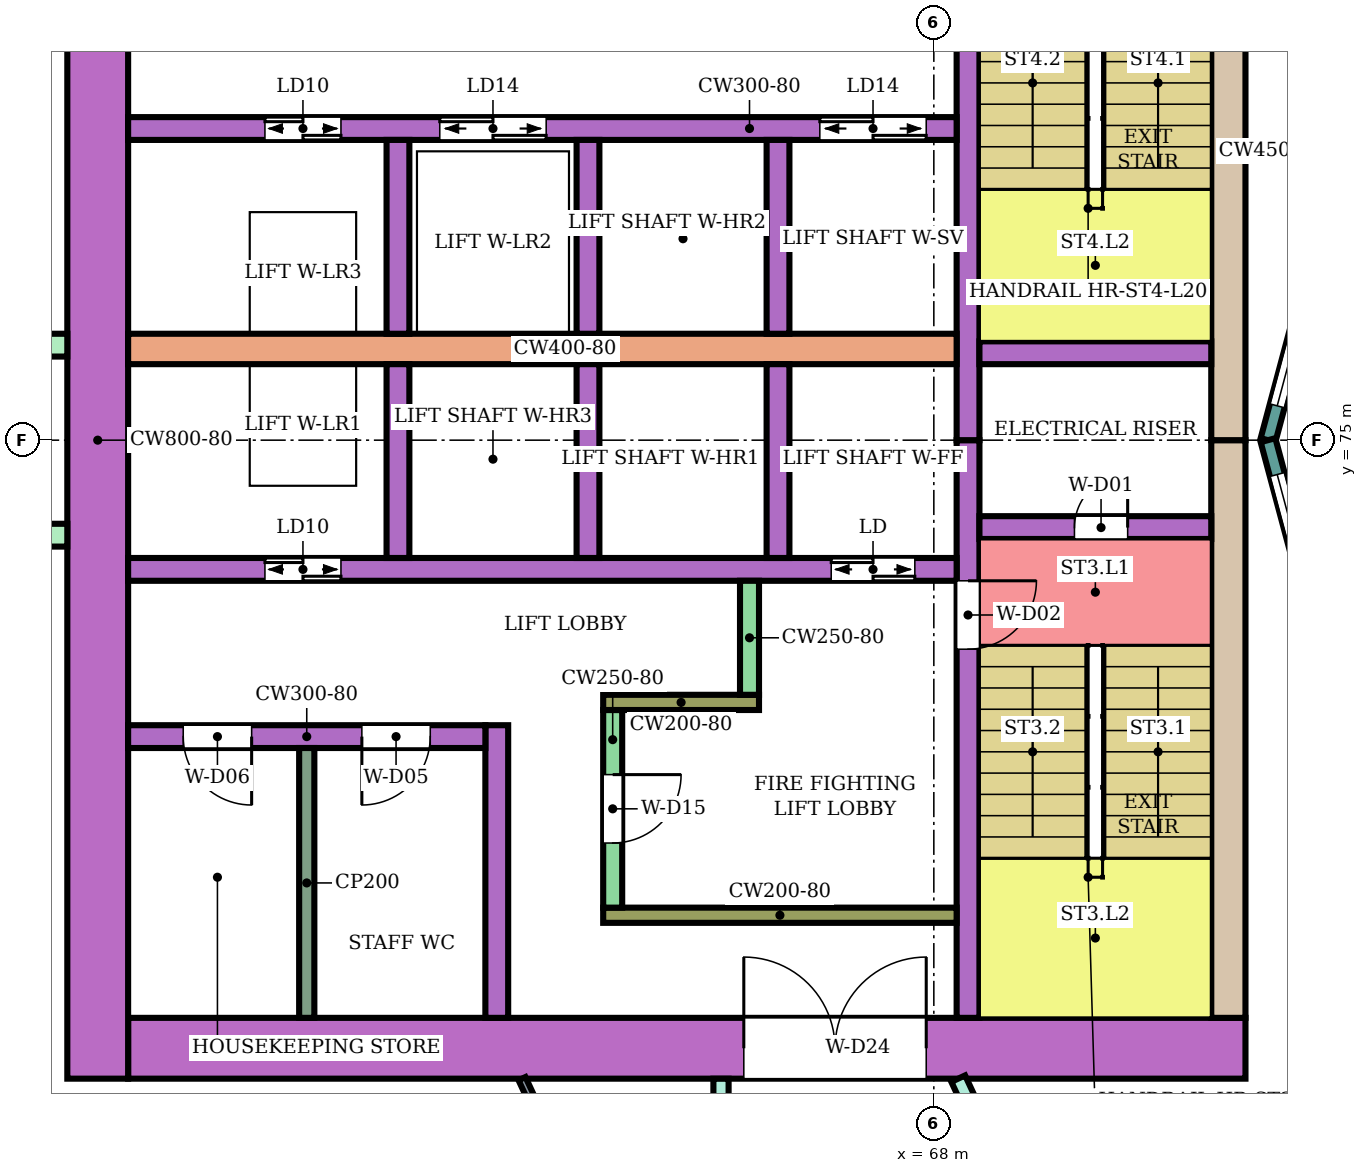
"""IFC4 building model, lengths in metres.
Left out: names, types, materials, properties, quantities, classifications, styles, units other than length and angle.
Written with IfcOpenShell. Run it as: python <this file> out.ifc"""

import sys

from ifc_helpers import new_model, si_unit, direction, frame, frame_2d, origin, place, context, subcontext, project, spatial, rectangle, extrude, element, fill, save


model = new_model("IFC4")
c1 = context("Model", 3, precision=1e-05, world=origin(), true_north=direction((0.0, 1.0)))
c2 = subcontext(c1, "Body", "Model", "MODEL_VIEW")
j1 = project(units=[si_unit("LENGTHUNIT", "METRE"), si_unit("PLANEANGLEUNIT", "RADIAN")], contexts=[c1])
p1 = place(None, origin())
s1 = spatial("IfcSite", under=j1, at=p1, CompositionType="ELEMENT")
p2 = place(p1, origin())
s2 = spatial("IfcBuilding", under=s1, at=p2, CompositionType="ELEMENT")
p3 = place(p2, frame((0.0, 0.0, 90.0)))
s3 = spatial("IfcBuildingStorey", under=s2, at=p3, CompositionType="ELEMENT", Elevation=90.0)
p4 = place(p3, frame((72.1, 67.0, 0.0), z_axis=(0.0, 0.0, 1.0), x_axis=(-1.0, 0.0, 0.0)))
e1 = element("IfcWall", 1, at=p4, inside=s3, PredefinedType="SHEAR", context=c2, shape_type="SweptSolid", body=[
    extrude(rectangle(XDim=14.7, YDim=0.8, at=frame_2d((7.35, 0.0))), origin(), (0.0, 0.0, 1.0), 3.48),
])
p5 = place(p4, frame((4.2, 0.0, 0.0)))
e2 = element("IfcOpeningElement", 2, at=p5, cuts=e1, PredefinedType="OPENING", context=c2, shape_type="SweptSolid", body=[
    extrude(rectangle(XDim=2.4, YDim=2.4, at=frame_2d((1.2, 1.2))), frame((0.0, 0.41, 0.0), z_axis=(0.0, -1.0, 0.0), x_axis=(1.0, 0.0, 0.0)), (0.0, 0.0, 1.0), 0.82),
])
for number, where, z_axis, x_axis in (
    (3, (71.875, 75.0, 0.0), (0.0, 0.0, 1.0), (0.0, -1.0, 0.0)),
    (4, (71.875, 82.6, 0.0), (0.0, 0.0, 1.0), (0.0, -1.0, 0.0)),
):
    element("IfcWall", number, at=place(p3, frame(where, z_axis=z_axis, x_axis=x_axis)), inside=s3, PredefinedType="SHEAR", context=c2, shape_type="SweptSolid", body=[
        extrude(rectangle(XDim=7.6, YDim=0.45, at=frame_2d((3.8, 0.0))), origin(), (0.0, 0.0, 1.0), 3.48),
    ])
p6 = place(p3, frame((57.0, 83.4, 0.0), z_axis=(0.0, 0.0, 1.0), x_axis=(0.0, -1.0, 0.0)))
e5 = element("IfcWall", 5, at=p6, inside=s3, PredefinedType="SHEAR", context=c2, shape_type="SweptSolid", body=[
    extrude(rectangle(XDim=16.8, YDim=0.8, at=frame_2d((8.4, 0.0))), origin(), (0.0, 0.0, 1.0), 3.48),
])
p7 = place(p3, frame((68.45, 75.0, 0.0), z_axis=(0.0, 0.0, 1.0), x_axis=(0.0, -1.0, 0.0)))
e6 = element("IfcWall", 6, at=p7, inside=s3, PredefinedType="SHEAR", context=c2, shape_type="SweptSolid", body=[
    extrude(rectangle(XDim=7.6, YDim=0.3, at=frame_2d((3.8, 0.0))), origin(), (0.0, 0.0, 1.0), 3.48),
])
p8 = place(p7, frame((1.85, 0.0, 0.0)))
e7 = element("IfcOpeningElement", 7, at=p8, cuts=e6, PredefinedType="OPENING", context=c2, shape_type="SweptSolid", body=[
    extrude(rectangle(XDim=0.9, YDim=2.1, at=frame_2d((0.45, 1.05))), frame((0.0, 0.16, 0.0), z_axis=(0.0, -1.0, 0.0), x_axis=(1.0, 0.0, 0.0)), (0.0, 0.0, 1.0), 0.32),
])
p9 = place(p3, frame((68.45, 82.6, 0.0), z_axis=(0.0, 0.0, 1.0), x_axis=(0.0, -1.0, 0.0)))
e8 = element("IfcWall", 8, at=p9, inside=s3, PredefinedType="SHEAR", context=c2, shape_type="SweptSolid", body=[
    extrude(rectangle(XDim=7.6, YDim=0.3, at=frame_2d((3.8, 0.0))), origin(), (0.0, 0.0, 1.0), 3.48),
])
p10 = place(p9, frame((0.25, 0.0, 0.0)))
e9 = element("IfcOpeningElement", 9, at=p10, cuts=e8, PredefinedType="OPENING", context=c2, shape_type="SweptSolid", body=[
    extrude(rectangle(XDim=0.9, YDim=2.1, at=frame_2d((0.45, 1.05))), frame((0.0, 0.16, 0.0), z_axis=(0.0, -1.0, 0.0), x_axis=(1.0, 0.0, 0.0)), (0.0, 0.0, 1.0), 0.32),
])
p11 = place(p3, frame((71.65, 73.85, 0.0), z_axis=(0.0, 0.0, 1.0), x_axis=(-1.0, 0.0, 0.0)))
e10 = element("IfcWall", 10, at=p11, inside=s3, PredefinedType="SHEAR", context=c2, shape_type="SweptSolid", body=[
    extrude(rectangle(XDim=3.05, YDim=0.3, at=frame_2d((1.525, 0.0))), origin(), (0.0, 0.0, 1.0), 3.48),
])
p12 = place(p11, frame((1.1, 0.0, 0.0)))
e11 = element("IfcOpeningElement", 11, at=p12, cuts=e10, PredefinedType="OPENING", context=c2, shape_type="SweptSolid", body=[
    extrude(rectangle(XDim=0.7, YDim=2.0, at=frame_2d((0.35, 1.0))), frame((0.0, 0.16, 0.0), z_axis=(0.0, -1.0, 0.0), x_axis=(1.0, 0.0, 0.0)), (0.0, 0.0, 1.0), 0.32),
])
p13 = place(p3, frame((71.65, 76.15, 0.0), z_axis=(0.0, 0.0, 1.0), x_axis=(-1.0, 0.0, 0.0)))
e12 = element("IfcWall", 12, at=p13, inside=s3, PredefinedType="SHEAR", context=c2, shape_type="SweptSolid", body=[
    extrude(rectangle(XDim=3.05, YDim=0.3, at=frame_2d((1.525, 0.0))), origin(), (0.0, 0.0, 1.0), 3.48),
])
p14 = place(p3, frame((68.3, 73.3, 0.0), z_axis=(0.0, 0.0, 1.0), x_axis=(-1.0, 0.0, 0.0)))
e13 = element("IfcWall", 13, at=p14, inside=s3, PredefinedType="SHEAR", context=c2, shape_type="SweptSolid", body=[
    extrude(rectangle(XDim=10.9, YDim=0.3, at=frame_2d((5.45, 0.0))), origin(), (0.0, 0.0, 1.0), 3.48),
])
p15 = place(p14, frame((0.55, 0.0, 0.0)))
e14 = element("IfcOpeningElement", 14, at=p15, cuts=e13, PredefinedType="OPENING", context=c2, shape_type="SweptSolid", body=[
    extrude(rectangle(XDim=1.1, YDim=2.1, at=frame_2d((0.55, 1.05))), frame((0.0, 0.16, 0.0), z_axis=(0.0, -1.0, 0.0), x_axis=(1.0, 0.0, 0.0)), (0.0, 0.0, 1.0), 0.32),
])
p16 = place(p14, frame((8.1, 0.0, 0.0)))
e15 = element("IfcOpeningElement", 15, at=p16, cuts=e13, PredefinedType="OPENING", context=c2, shape_type="SweptSolid", body=[
    extrude(rectangle(XDim=1.0, YDim=2.1, at=frame_2d((0.5, 1.05))), frame((0.0, 0.16, 0.0), z_axis=(0.0, -1.0, 0.0), x_axis=(1.0, 0.0, 0.0)), (0.0, 0.0, 1.0), 0.32),
])
p17 = place(p3, frame((68.3, 76.2, 0.0), z_axis=(0.0, 0.0, 1.0), x_axis=(-1.0, 0.0, 0.0)))
e16 = element("IfcWall", 16, at=p17, inside=s3, PredefinedType="SHEAR", context=c2, shape_type="SweptSolid", body=[
    extrude(rectangle(XDim=10.9, YDim=0.4, at=frame_2d((5.45, 0.0))), origin(), (0.0, 0.0, 1.0), 3.48),
])
p18 = place(p3, frame((68.3, 79.1, 0.0), z_axis=(0.0, 0.0, 1.0), x_axis=(-1.0, 0.0, 0.0)))
e17 = element("IfcWall", 17, at=p18, inside=s3, PredefinedType="SHEAR", context=c2, shape_type="SweptSolid", body=[
    extrude(rectangle(XDim=10.9, YDim=0.3, at=frame_2d((5.45, 0.0))), origin(), (0.0, 0.0, 1.0), 3.48),
])
p19 = place(p18, frame((0.4, 0.0, 0.0)))
e18 = element("IfcOpeningElement", 18, at=p19, cuts=e17, PredefinedType="OPENING", context=c2, shape_type="SweptSolid", body=[
    extrude(rectangle(XDim=1.4, YDim=2.1, at=frame_2d((0.7, 1.05))), frame((0.0, 0.16, 0.0), z_axis=(0.0, -1.0, 0.0), x_axis=(1.0, 0.0, 0.0)), (0.0, 0.0, 1.0), 0.32),
])
p20 = place(p18, frame((5.4, 0.0, 0.0)))
e19 = element("IfcOpeningElement", 19, at=p20, cuts=e17, PredefinedType="OPENING", context=c2, shape_type="SweptSolid", body=[
    extrude(rectangle(XDim=1.4, YDim=2.1, at=frame_2d((0.7, 1.05))), frame((0.0, 0.16, 0.0), z_axis=(0.0, -1.0, 0.0), x_axis=(1.0, 0.0, 0.0)), (0.0, 0.0, 1.0), 0.32),
])
p21 = place(p18, frame((8.1, 0.0, 0.0)))
e20 = element("IfcOpeningElement", 20, at=p21, cuts=e17, PredefinedType="OPENING", context=c2, shape_type="SweptSolid", body=[
    extrude(rectangle(XDim=1.0, YDim=2.1, at=frame_2d((0.5, 1.05))), frame((0.0, 0.16, 0.0), z_axis=(0.0, -1.0, 0.0), x_axis=(1.0, 0.0, 0.0)), (0.0, 0.0, 1.0), 0.32),
])
for number, where, z_axis, x_axis in (
    (21, (65.95, 76.0, 0.0), (0.0, 0.0, 1.0), (0.0, -1.0, 0.0)),
    (22, (63.45, 76.0, 0.0), (0.0, 0.0, 1.0), (0.0, -1.0, 0.0)),
    (23, (60.95, 76.0, 0.0), (0.0, 0.0, 1.0), (0.0, -1.0, 0.0)),
    (24, (65.95, 78.95, 0.0), (0.0, 0.0, 1.0), (0.0, -1.0, 0.0)),
    (25, (63.45, 78.95, 0.0), (0.0, 0.0, 1.0), (0.0, -1.0, 0.0)),
    (26, (60.95, 78.95, 0.0), (0.0, 0.0, 1.0), (0.0, -1.0, 0.0)),
):
    element("IfcWall", number, at=place(p3, frame(where, z_axis=z_axis, x_axis=x_axis)), inside=s3, PredefinedType="SHEAR", context=c2, shape_type="SweptSolid", body=[
        extrude(rectangle(XDim=2.55, YDim=0.3, at=frame_2d((1.275, 0.0))), origin(), (0.0, 0.0, 1.0), 3.48),
    ])
p22 = place(p3, frame((68.3, 68.75, 0.0), z_axis=(0.0, 0.0, 1.0), x_axis=(-1.0, 0.0, 0.0)))
e27 = element("IfcWall", 27, at=p22, inside=s3, PredefinedType="SHEAR", context=c2, shape_type="SweptSolid", body=[
    extrude(rectangle(XDim=4.65, YDim=0.2, at=frame_2d((2.325, 0.0))), origin(), (0.0, 0.0, 1.0), 3.48),
])
p23 = place(p3, frame((63.775, 71.45, 0.0), z_axis=(0.0, 0.0, 1.0), x_axis=(0.0, -1.0, 0.0)))
e28 = element("IfcWall", 28, at=p23, inside=s3, PredefinedType="SHEAR", context=c2, shape_type="SweptSolid", body=[
    extrude(rectangle(XDim=2.6, YDim=0.25, at=frame_2d((1.3, 0.0))), origin(), (0.0, 0.0, 1.0), 3.48),
])
p24 = place(p23, frame((0.85, 0.0, 0.0)))
e29 = element("IfcOpeningElement", 29, at=p24, cuts=e28, PredefinedType="OPENING", context=c2, shape_type="SweptSolid", body=[
    extrude(rectangle(XDim=0.9, YDim=2.1, at=frame_2d((0.45, 1.05))), frame((0.0, 0.135, 0.0), z_axis=(0.0, -1.0, 0.0), x_axis=(1.0, 0.0, 0.0)), (0.0, 0.0, 1.0), 0.27),
])
p25 = place(p3, frame((65.7, 71.55, 0.0), z_axis=(0.0, 0.0, 1.0), x_axis=(-1.0, 0.0, 0.0)))
e30 = element("IfcWall", 30, at=p25, inside=s3, PredefinedType="SHEAR", context=c2, shape_type="SweptSolid", body=[
    extrude(rectangle(XDim=2.05, YDim=0.2, at=frame_2d((1.025, 0.0))), origin(), (0.0, 0.0, 1.0), 3.48),
])
p26 = place(p3, frame((65.575, 73.15, 0.0), z_axis=(0.0, 0.0, 1.0), x_axis=(0.0, -1.0, 0.0)))
e31 = element("IfcWall", 31, at=p26, inside=s3, PredefinedType="SHEAR", context=c2, shape_type="SweptSolid", body=[
    extrude(rectangle(XDim=1.5, YDim=0.25, at=frame_2d((0.75, 0.0))), origin(), (0.0, 0.0, 1.0), 3.48),
])
p27 = place(p3, frame((62.25, 71.25, 0.0), z_axis=(0.0, 0.0, 1.0), x_axis=(0.0, -1.0, 0.0)))
e32 = element("IfcWall", 32, at=p27, inside=s3, PredefinedType="SHEAR", context=c2, shape_type="SweptSolid", body=[
    extrude(rectangle(XDim=3.85, YDim=0.3, at=frame_2d((1.925, 0.0))), origin(), (0.0, 0.0, 1.0), 3.48),
])
p28 = place(p3, frame((62.1, 71.1, 0.0), z_axis=(0.0, 0.0, 1.0), x_axis=(-1.0, 0.0, 0.0)))
e33 = element("IfcWall", 33, at=p28, inside=s3, PredefinedType="SHEAR", context=c2, shape_type="SweptSolid", body=[
    extrude(rectangle(XDim=4.7, YDim=0.3, at=frame_2d((2.35, 0.0))), origin(), (0.0, 0.0, 1.0), 3.48),
])
p29 = place(p28, frame((0.725, 0.0, 0.0)))
e34 = element("IfcOpeningElement", 34, at=p29, cuts=e33, PredefinedType="OPENING", context=c2, shape_type="SweptSolid", body=[
    extrude(rectangle(XDim=0.9, YDim=2.1, at=frame_2d((0.45, 1.05))), frame((0.0, 0.16, 0.0), z_axis=(0.0, -1.0, 0.0), x_axis=(1.0, 0.0, 0.0)), (0.0, 0.0, 1.0), 0.32),
])
p30 = place(p28, frame((3.075, 0.0, 0.0)))
e35 = element("IfcOpeningElement", 35, at=p30, cuts=e33, PredefinedType="OPENING", context=c2, shape_type="SweptSolid", body=[
    extrude(rectangle(XDim=0.9, YDim=2.1, at=frame_2d((0.45, 1.05))), frame((0.0, 0.16, 0.0), z_axis=(0.0, -1.0, 0.0), x_axis=(1.0, 0.0, 0.0)), (0.0, 0.0, 1.0), 0.32),
])
for number, where, z_axis, x_axis in (
    (36, (56.6, 76.25, 0.0), (0.0, 0.0, 1.0), (-1.0, 0.0, 0.0)),
    (37, (56.6, 73.75, 0.0), (0.0, 0.0, 1.0), (-1.0, 0.0, 0.0)),
):
    element("IfcWall", number, at=place(p3, frame(where, z_axis=z_axis, x_axis=x_axis)), inside=s3, PredefinedType="NOTDEFINED", context=c2, shape_type="SweptSolid", body=[
        extrude(rectangle(XDim=2.416, YDim=0.3, at=frame_2d((1.208, 0.0))), origin(), (0.0, 0.0, 1.0), 3.8),
    ])
p31 = place(p3, frame((73.415, 78.802, 0.0), z_axis=(0.0, 0.0, 1.0), x_axis=(-0.258789828301, -0.965933654434, 0.0)))
e38 = element("IfcWall", 38, at=p31, inside=s3, PredefinedType="NOTDEFINED", context=c2, shape_type="SweptSolid", body=[
    extrude(rectangle(XDim=3.936, YDim=0.2, at=frame_2d((1.968, 0.0))), origin(), (0.0, 0.0, 1.0), 3.8),
])
p32 = place(p31, frame((0.468, 0.0, 0.9)))
e39 = element("IfcOpeningElement", 39, at=p32, cuts=e38, PredefinedType="OPENING", context=c2, shape_type="SweptSolid", body=[
    extrude(rectangle(XDim=3.0, YDim=2.3, at=frame_2d((1.5, 1.15))), frame((0.0, 0.11, 0.0), z_axis=(0.0, -1.0, 0.0), x_axis=(1.0, 0.0, 0.0)), (0.0, 0.0, 1.0), 0.22),
])
p33 = place(p3, frame((72.396, 75.0, 0.0), z_axis=(0.0, 0.0, 1.0), x_axis=(0.258789828301, -0.965933654434, 0.0)))
e40 = element("IfcWall", 40, at=p33, inside=s3, PredefinedType="NOTDEFINED", context=c2, shape_type="SweptSolid", body=[
    extrude(rectangle(XDim=3.936, YDim=0.2, at=frame_2d((1.968, 0.0))), origin(), (0.0, 0.0, 1.0), 3.8),
])
p34 = place(p33, frame((0.468, 0.0, 0.9)))
e41 = element("IfcOpeningElement", 41, at=p34, cuts=e40, PredefinedType="OPENING", context=c2, shape_type="SweptSolid", body=[
    extrude(rectangle(XDim=3.0, YDim=2.3, at=frame_2d((1.5, 1.15))), frame((0.0, 0.11, 0.0), z_axis=(0.0, -1.0, 0.0), x_axis=(1.0, 0.0, 0.0)), (0.0, 0.0, 1.0), 0.22),
])
p35 = place(p3, frame((65.2, 65.2, 0.0), z_axis=(0.0, 0.0, 1.0), x_axis=(0.0, 1.0, 0.0)))
e42 = element("IfcWall", 42, at=p35, inside=s3, PredefinedType="PARTITIONING", context=c2, shape_type="SweptSolid", body=[
    extrude(rectangle(XDim=1.399, YDim=0.2, at=frame_2d((0.7, 0.0))), origin(), (0.0, 0.0, 1.0), 3.35),
])
p36 = place(p3, frame((68.321, 66.6, 0.0), z_axis=(0.0, 0.0, 1.0), x_axis=(0.421914092414, -0.906635813666, 0.0)))
e43 = element("IfcWall", 43, at=p36, inside=s3, PredefinedType="PARTITIONING", context=c2, shape_type="SweptSolid", body=[
    extrude(rectangle(XDim=7.459, YDim=0.2, at=frame_2d((3.73, 0.0))), origin(), (0.0, 0.0, 1.0), 3.35),
])
p37 = place(p36, frame((0.7, 0.0, 0.0)))
e44 = element("IfcOpeningElement", 44, at=p37, cuts=e43, PredefinedType="OPENING", context=c2, shape_type="SweptSolid", body=[
    extrude(rectangle(XDim=1.0, YDim=2.1, at=frame_2d((0.5, 1.05))), frame((0.0, 0.11, 0.0), z_axis=(0.0, -1.0, 0.0), x_axis=(1.0, 0.0, 0.0)), (0.0, 0.0, 1.0), 0.22),
])
p38 = place(p3, frame((71.459, 60.218, 0.0), z_axis=(0.0, 0.0, 1.0), x_axis=(0.500232027118, 0.865891401416, 0.0)))
e45 = element("IfcWall", 45, at=p38, inside=s3, PredefinedType="PARTITIONING", context=c2, shape_type="SweptSolid", body=[
    extrude(rectangle(XDim=9.372, YDim=0.2, at=frame_2d((4.686, 0.0))), origin(), (0.0, 0.0, 1.0), 3.35),
])
p39 = place(p3, frame((62.582, 66.6, 0.0), z_axis=(0.0, 0.0, 1.0), x_axis=(0.422283870085, -0.906463641337, 0.0)))
e46 = element("IfcWall", 46, at=p39, inside=s3, PredefinedType="PARTITIONING", context=c2, shape_type="SweptSolid", body=[
    extrude(rectangle(XDim=6.666, YDim=0.1, at=frame_2d((3.333, 0.0))), origin(), (0.0, 0.0, 1.0), 3.35),
])
p40 = place(p39, frame((1.953, 0.0, 0.0)))
e47 = element("IfcOpeningElement", 47, at=p40, cuts=e46, PredefinedType="OPENING", context=c2, shape_type="SweptSolid", body=[
    extrude(rectangle(XDim=0.9, YDim=2.1, at=frame_2d((0.45, 1.05))), frame((0.0, 0.06, 0.0), z_axis=(0.0, -1.0, 0.0), x_axis=(1.0, 0.0, 0.0)), (0.0, 0.0, 1.0), 0.12),
])
p41 = place(p3, frame((59.75, 70.95, 0.0), z_axis=(0.0, 0.0, 1.0), x_axis=(0.0, -1.0, 0.0)))
e48 = element("IfcWall", 48, at=p41, inside=s3, PredefinedType="PARTITIONING", context=c2, shape_type="SweptSolid", body=[
    extrude(rectangle(XDim=3.55, YDim=0.2, at=frame_2d((1.775, 0.0))), origin(), (0.0, 0.0, 1.0), 3.48),
])
p42 = place(p32, origin())
e49 = element("IfcWindow", 49, at=p42, inside=s3, PartitioningType="SINGLE_PANEL", PredefinedType="WINDOW", context=c2, shape_type="SweptSolid", body=[
    extrude(rectangle(XDim=3.0, YDim=2.3, at=frame_2d((1.5, 1.15))), frame((0.0, 0.03, 0.0), z_axis=(0.0, -1.0, 0.0), x_axis=(1.0, 0.0, 0.0)), (0.0, 0.0, 1.0), 0.06),
])
fill(e39, e49)
p43 = place(p34, origin())
e50 = element("IfcWindow", 50, at=p43, inside=s3, PartitioningType="SINGLE_PANEL", PredefinedType="WINDOW", context=c2, shape_type="SweptSolid", body=[
    extrude(rectangle(XDim=3.0, YDim=2.3, at=frame_2d((1.5, 1.15))), frame((0.0, 0.03, 0.0), z_axis=(0.0, -1.0, 0.0), x_axis=(1.0, 0.0, 0.0)), (0.0, 0.0, 1.0), 0.06),
])
fill(e41, e50)
p44 = place(p12, frame((0.7, 0.0, 0.0), z_axis=(0.0, 0.0, 1.0), x_axis=(-1.0, 0.0, 0.0)))
e51 = element("IfcDoor", 51, at=p44, inside=s3, OperationType="SINGLE_SWING_RIGHT", PredefinedType="DOOR", context=c2, shape_type="SweptSolid", body=[
    extrude(rectangle(XDim=0.7, YDim=2.0, at=frame_2d((0.35, 1.0))), frame((0.0, 0.025, 0.0), z_axis=(0.0, -1.0, 0.0), x_axis=(1.0, 0.0, 0.0)), (0.0, 0.0, 1.0), 0.05),
])
fill(e11, e51)
p45 = place(p8, origin())
e52 = element("IfcDoor", 52, at=p45, inside=s3, OperationType="SINGLE_SWING_LEFT", PredefinedType="DOOR", context=c2, shape_type="SweptSolid", body=[
    extrude(rectangle(XDim=0.9, YDim=2.1, at=frame_2d((0.45, 1.05))), frame((0.0, 0.025, 0.0), z_axis=(0.0, -1.0, 0.0), x_axis=(1.0, 0.0, 0.0)), (0.0, 0.0, 1.0), 0.05),
])
fill(e7, e52)
p46 = place(p15, origin())
e53 = element("IfcDoor", 53, at=p46, inside=s3, OperationType="DOUBLE_DOOR_SLIDING", PredefinedType="DOOR", context=c2, shape_type="SweptSolid", body=[
    extrude(rectangle(XDim=1.1, YDim=2.1, at=frame_2d((0.55, 1.05))), frame((0.0, 0.025, 0.0), z_axis=(0.0, -1.0, 0.0), x_axis=(1.0, 0.0, 0.0)), (0.0, 0.0, 1.0), 0.05),
])
fill(e14, e53)
p47 = place(p16, origin())
e54 = element("IfcDoor", 54, at=p47, inside=s3, OperationType="DOUBLE_DOOR_SLIDING", PredefinedType="DOOR", context=c2, shape_type="SweptSolid", body=[
    extrude(rectangle(XDim=1.0, YDim=2.1, at=frame_2d((0.5, 1.05))), frame((0.0, 0.025, 0.0), z_axis=(0.0, -1.0, 0.0), x_axis=(1.0, 0.0, 0.0)), (0.0, 0.0, 1.0), 0.05),
])
fill(e15, e54)
p48 = place(p19, origin())
e55 = element("IfcDoor", 55, at=p48, inside=s3, OperationType="DOUBLE_DOOR_SLIDING", PredefinedType="DOOR", context=c2, shape_type="SweptSolid", body=[
    extrude(rectangle(XDim=1.4, YDim=2.1, at=frame_2d((0.7, 1.05))), frame((0.0, 0.025, 0.0), z_axis=(0.0, -1.0, 0.0), x_axis=(1.0, 0.0, 0.0)), (0.0, 0.0, 1.0), 0.05),
])
fill(e18, e55)
p49 = place(p20, origin())
e56 = element("IfcDoor", 56, at=p49, inside=s3, OperationType="DOUBLE_DOOR_SLIDING", PredefinedType="DOOR", context=c2, shape_type="SweptSolid", body=[
    extrude(rectangle(XDim=1.4, YDim=2.1, at=frame_2d((0.7, 1.05))), frame((0.0, 0.025, 0.0), z_axis=(0.0, -1.0, 0.0), x_axis=(1.0, 0.0, 0.0)), (0.0, 0.0, 1.0), 0.05),
])
fill(e19, e56)
p50 = place(p21, origin())
e57 = element("IfcDoor", 57, at=p50, inside=s3, OperationType="DOUBLE_DOOR_SLIDING", PredefinedType="DOOR", context=c2, shape_type="SweptSolid", body=[
    extrude(rectangle(XDim=1.0, YDim=2.1, at=frame_2d((0.5, 1.05))), frame((0.0, 0.025, 0.0), z_axis=(0.0, -1.0, 0.0), x_axis=(1.0, 0.0, 0.0)), (0.0, 0.0, 1.0), 0.05),
])
fill(e20, e57)
p51 = place(p24, origin())
e58 = element("IfcDoor", 58, at=p51, inside=s3, OperationType="SINGLE_SWING_LEFT", PredefinedType="DOOR", context=c2, shape_type="SweptSolid", body=[
    extrude(rectangle(XDim=0.9, YDim=2.1, at=frame_2d((0.45, 1.05))), frame((0.0, 0.025, 0.0), z_axis=(0.0, -1.0, 0.0), x_axis=(1.0, 0.0, 0.0)), (0.0, 0.0, 1.0), 0.05),
])
fill(e29, e58)
p52 = place(p29, origin())
e59 = element("IfcDoor", 59, at=p52, inside=s3, OperationType="SINGLE_SWING_RIGHT", PredefinedType="DOOR", context=c2, shape_type="SweptSolid", body=[
    extrude(rectangle(XDim=0.9, YDim=2.1, at=frame_2d((0.45, 1.05))), frame((0.0, 0.025, 0.0), z_axis=(0.0, -1.0, 0.0), x_axis=(1.0, 0.0, 0.0)), (0.0, 0.0, 1.0), 0.05),
])
fill(e34, e59)
p53 = place(p30, origin())
e60 = element("IfcDoor", 60, at=p53, inside=s3, OperationType="SINGLE_SWING_LEFT", PredefinedType="DOOR", context=c2, shape_type="SweptSolid", body=[
    extrude(rectangle(XDim=0.9, YDim=2.1, at=frame_2d((0.45, 1.05))), frame((0.0, 0.025, 0.0), z_axis=(0.0, -1.0, 0.0), x_axis=(1.0, 0.0, 0.0)), (0.0, 0.0, 1.0), 0.05),
])
fill(e35, e60)
p54 = place(p5, frame((2.4, 0.0, 0.0), z_axis=(0.0, 0.0, 1.0), x_axis=(-1.0, 0.0, 0.0)))
e61 = element("IfcDoor", 61, at=p54, inside=s3, OperationType="DOUBLE_DOOR_SINGLE_SWING", PredefinedType="DOOR", context=c2, shape_type="SweptSolid", body=[
    extrude(rectangle(XDim=2.4, YDim=2.4, at=frame_2d((1.2, 1.2))), frame((0.0, 0.025, 0.0), z_axis=(0.0, -1.0, 0.0), x_axis=(1.0, 0.0, 0.0)), (0.0, 0.0, 1.0), 0.05),
])
fill(e2, e61)
save(model, sys.argv[1])
